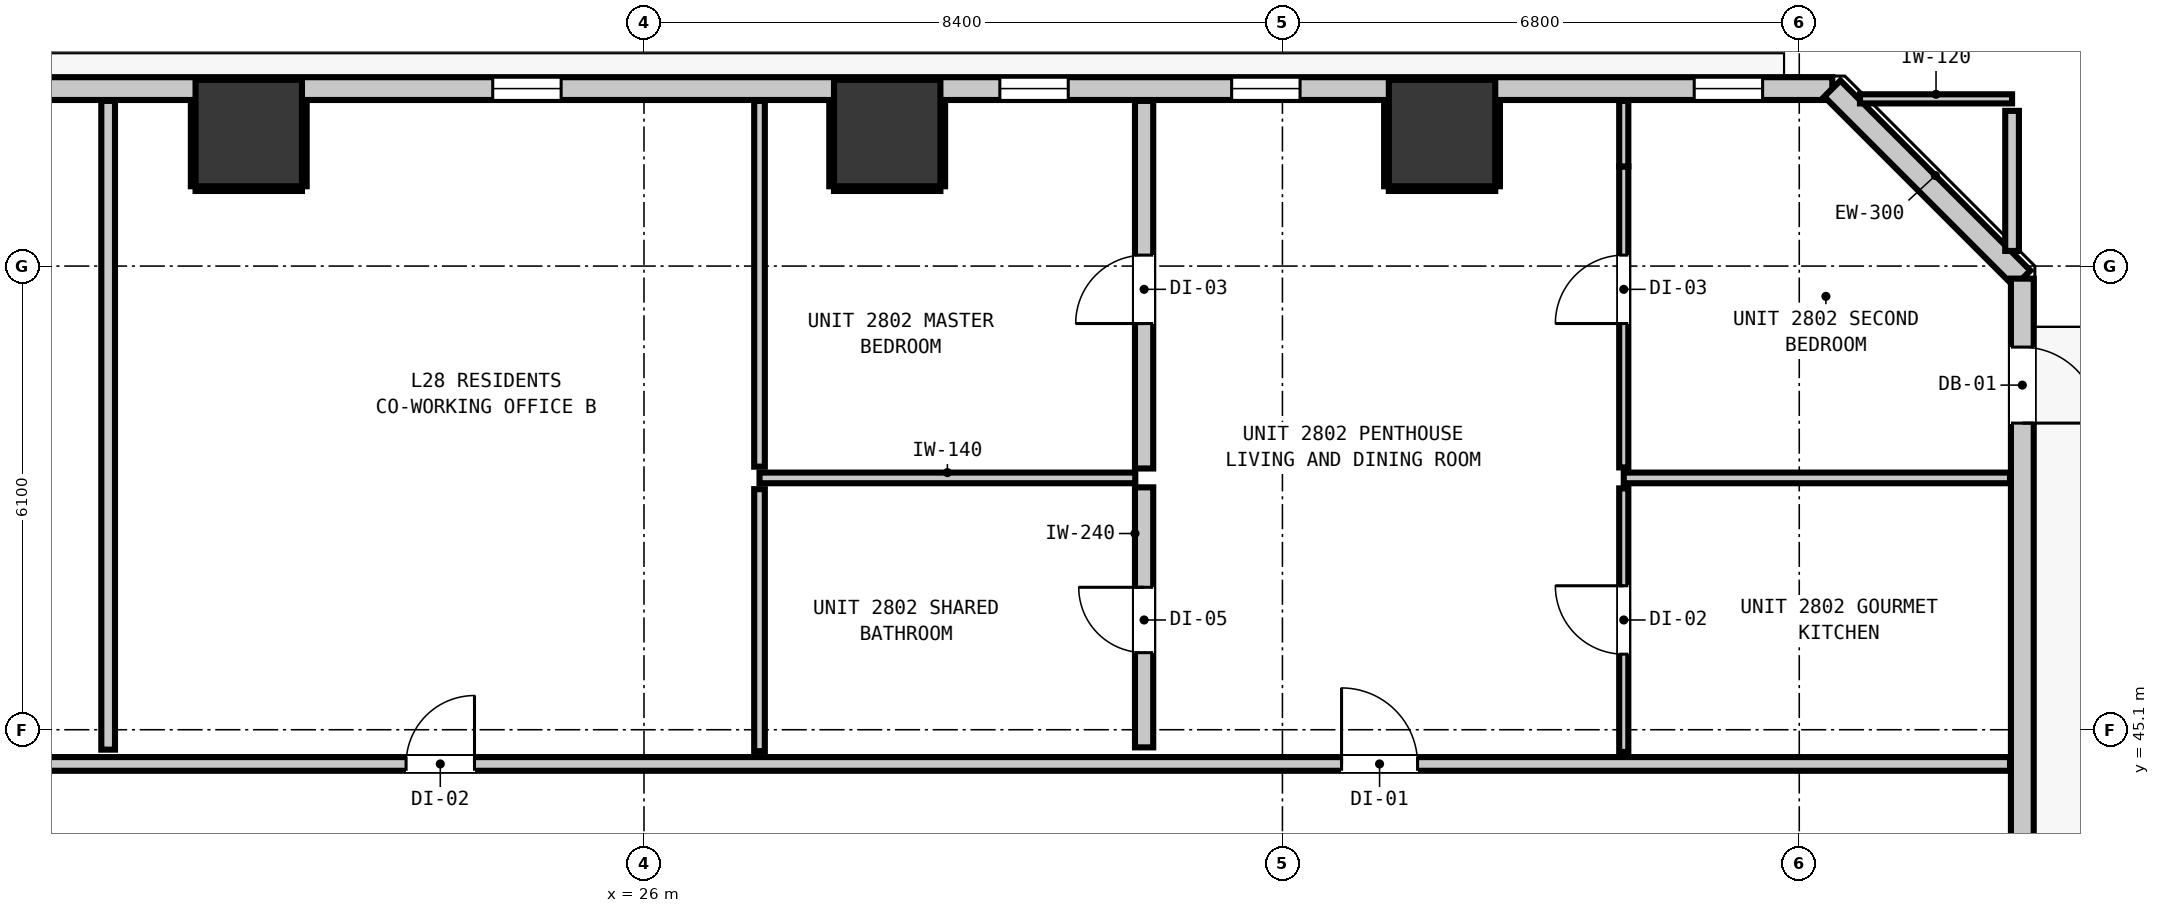
"""IFC4 building model, lengths in metres.
Left out: names, types, materials, properties, quantities, classifications, styles, units other than length and angle.
Written with IfcOpenShell. Run it as: python <this file> out.ifc"""

import sys

from ifc_helpers import new_model, si_unit, direction, frame, frame_2d, origin, origin_2d, place, context, subcontext, project, spatial, rectangle, extrude, element, fill, save


model = new_model("IFC4")
c1 = context("Model", 3, precision=1e-05, world=origin(), true_north=direction((0.0, 1.0)))
c2 = subcontext(c1, "Body", "Model", "MODEL_VIEW")
j1 = project(units=[si_unit("LENGTHUNIT", "METRE"), si_unit("PLANEANGLEUNIT", "RADIAN")], contexts=[c1])
p1 = place(None, origin())
s1 = spatial("IfcSite", under=j1, at=p1, CompositionType="ELEMENT")
p2 = place(p1, origin())
s2 = spatial("IfcBuilding", under=s1, at=p2, CompositionType="ELEMENT")
p3 = place(p2, frame((0.0, 0.0, 99.44)))
s3 = spatial("IfcBuildingStorey", under=s2, at=p3, CompositionType="ELEMENT", Elevation=99.44)
for number, where, z_axis, x_axis in (
    (1, (20.8, 52.95, 0.0), (0.0, 0.0, 1.0), (1.0, 0.0, 0.0)),
    (2, (29.2, 52.95, 0.0), (0.0, 0.0, 1.0), (1.0, 0.0, 0.0)),
    (3, (36.5, 52.95, 0.0), (0.0, 0.0, 1.0), (1.0, 0.0, 0.0)),
):
    element("IfcColumn", number, at=place(p3, frame(where, z_axis=z_axis, x_axis=x_axis)), inside=s3, PredefinedType="COLUMN", context=c2, shape_type="SweptSolid", body=[
        extrude(rectangle(XDim=1.4, YDim=1.4, at=origin_2d()), origin(), (0.0, 0.0, 1.0), 3.32),
    ])
p4 = place(p3, frame((4.165, 53.535, 0.0), z_axis=(0.0, 0.0, 1.0), x_axis=(1.0, 0.0, 0.0)))
e4 = element("IfcWall", 4, at=p4, inside=s3, PredefinedType="STANDARD", context=c2, shape_type="SweptSolid", body=[
    extrude(rectangle(XDim=37.47, YDim=0.3, at=frame_2d((18.735, 0.0))), origin(), (0.0, 0.0, 1.0), 3.06),
])
p5 = place(p4, frame((0.901, 0.0, 0.0)))
e5 = element("IfcOpeningElement", 5, at=p5, cuts=e4, PredefinedType="OPENING", context=c2, shape_type="SweptSolid", body=[
    extrude(rectangle(XDim=1.0, YDim=2.15, at=frame_2d((0.5, 1.075))), frame((0.0, 0.16, 0.0), z_axis=(0.0, -1.0, 0.0), x_axis=(1.0, 0.0, 0.0)), (0.0, 0.0, 1.0), 0.32),
])
p6 = place(p4, frame((4.868, 0.0, 0.85)))
e6 = element("IfcOpeningElement", 6, at=p6, cuts=e4, PredefinedType="OPENING", context=c2, shape_type="SweptSolid", body=[
    extrude(rectangle(XDim=0.9, YDim=1.5, at=frame_2d((0.45, 0.75))), frame((0.0, 0.16, 0.0), z_axis=(0.0, -1.0, 0.0), x_axis=(1.0, 0.0, 0.0)), (0.0, 0.0, 1.0), 0.32),
])
p7 = place(p4, frame((19.845, 0.0, 0.85)))
e7 = element("IfcOpeningElement", 7, at=p7, cuts=e4, PredefinedType="OPENING", context=c2, shape_type="SweptSolid", body=[
    extrude(rectangle(XDim=0.9, YDim=1.5, at=frame_2d((0.45, 0.75))), frame((0.0, 0.16, 0.0), z_axis=(0.0, -1.0, 0.0), x_axis=(1.0, 0.0, 0.0)), (0.0, 0.0, 1.0), 0.32),
])
p8 = place(p4, frame((29.567, 0.0, 0.85)))
e8 = element("IfcOpeningElement", 8, at=p8, cuts=e4, PredefinedType="OPENING", context=c2, shape_type="SweptSolid", body=[
    extrude(rectangle(XDim=0.9, YDim=1.5, at=frame_2d((0.45, 0.75))), frame((0.0, 0.16, 0.0), z_axis=(0.0, -1.0, 0.0), x_axis=(1.0, 0.0, 0.0)), (0.0, 0.0, 1.0), 0.32),
])
p9 = place(p4, frame((26.517, 0.0, 0.85)))
e9 = element("IfcOpeningElement", 9, at=p9, cuts=e4, PredefinedType="OPENING", context=c2, shape_type="SweptSolid", body=[
    extrude(rectangle(XDim=0.9, YDim=1.5, at=frame_2d((0.45, 0.75))), frame((0.0, 0.16, 0.0), z_axis=(0.0, -1.0, 0.0), x_axis=(1.0, 0.0, 0.0)), (0.0, 0.0, 1.0), 0.32),
])
p10 = place(p4, frame((35.653, 0.0, 0.85)))
e10 = element("IfcOpeningElement", 10, at=p10, cuts=e4, PredefinedType="OPENING", context=c2, shape_type="SweptSolid", body=[
    extrude(rectangle(XDim=0.9, YDim=1.5, at=frame_2d((0.45, 0.75))), frame((0.0, 0.16, 0.0), z_axis=(0.0, -1.0, 0.0), x_axis=(1.0, 0.0, 0.0)), (0.0, 0.0, 1.0), 0.32),
])
p11 = place(p3, frame((41.635, 53.535, 0.0), z_axis=(0.0, 0.0, 1.0), x_axis=(0.707106781187, -0.707106781187, 0.0)))
e11 = element("IfcWall", 11, at=p11, inside=s3, PredefinedType="STANDARD", context=c2, shape_type="SweptSolid", body=[
    extrude(rectangle(XDim=3.536, YDim=0.3, at=frame_2d((1.768, 0.0))), origin(), (0.0, 0.0, 1.0), 3.06),
])
p12 = place(p3, frame((44.135, 51.035, 0.0), z_axis=(0.0, 0.0, 1.0), x_axis=(0.0, -1.0, 0.0)))
e12 = element("IfcWall", 12, at=p12, inside=s3, PredefinedType="STANDARD", context=c2, shape_type="SweptSolid", body=[
    extrude(rectangle(XDim=34.67, YDim=0.3, at=frame_2d((17.335, 0.0))), origin(), (0.0, 0.0, 1.0), 3.06),
])
p13 = place(p12, frame((0.901, 0.0, 0.0)))
e13 = element("IfcOpeningElement", 13, at=p13, cuts=e12, PredefinedType="OPENING", context=c2, shape_type="SweptSolid", body=[
    extrude(rectangle(XDim=1.0, YDim=2.15, at=frame_2d((0.5, 1.075))), frame((0.0, 0.16, 0.0), z_axis=(0.0, -1.0, 0.0), x_axis=(1.0, 0.0, 0.0)), (0.0, 0.0, 1.0), 0.32),
])
p14 = place(p12, frame((32.682, 0.0, 0.85)))
e14 = element("IfcOpeningElement", 14, at=p14, cuts=e12, PredefinedType="OPENING", context=c2, shape_type="SweptSolid", body=[
    extrude(rectangle(XDim=0.9, YDim=1.5, at=frame_2d((0.45, 0.75))), frame((0.0, 0.16, 0.0), z_axis=(0.0, -1.0, 0.0), x_axis=(1.0, 0.0, 0.0)), (0.0, 0.0, 1.0), 0.32),
])
p15 = place(p12, frame((23.323, 0.0, 0.85)))
e15 = element("IfcOpeningElement", 15, at=p15, cuts=e12, PredefinedType="OPENING", context=c2, shape_type="SweptSolid", body=[
    extrude(rectangle(XDim=0.9, YDim=1.5, at=frame_2d((0.45, 0.75))), frame((0.0, 0.16, 0.0), z_axis=(0.0, -1.0, 0.0), x_axis=(1.0, 0.0, 0.0)), (0.0, 0.0, 1.0), 0.32),
])
p16 = place(p3, frame((1.827, 44.65, 0.0), z_axis=(0.0, 0.0, 1.0), x_axis=(1.0, 0.0, 0.0)))
e16 = element("IfcWall", 16, at=p16, inside=s3, PredefinedType="PARTITIONING", context=c2, shape_type="SweptSolid", body=[
    extrude(rectangle(XDim=42.146, YDim=0.18, at=frame_2d((21.073, 0.0))), origin(), (0.0, 0.0, 1.0), 3.06),
])
p17 = place(p16, frame((8.207, 0.0, 0.0)))
e17 = element("IfcOpeningElement", 17, at=p17, cuts=e16, PredefinedType="OPENING", context=c2, shape_type="SweptSolid", body=[
    extrude(rectangle(XDim=0.9, YDim=2.1, at=frame_2d((0.45, 1.05))), frame((0.0, 0.1, 0.0), z_axis=(0.0, -1.0, 0.0), x_axis=(1.0, 0.0, 0.0)), (0.0, 0.0, 1.0), 0.2),
])
p18 = place(p16, frame((21.043, 0.0, 0.0)))
e18 = element("IfcOpeningElement", 18, at=p18, cuts=e16, PredefinedType="OPENING", context=c2, shape_type="SweptSolid", body=[
    extrude(rectangle(XDim=0.9, YDim=2.1, at=frame_2d((0.45, 1.05))), frame((0.0, 0.1, 0.0), z_axis=(0.0, -1.0, 0.0), x_axis=(1.0, 0.0, 0.0)), (0.0, 0.0, 1.0), 0.2),
])
p19 = place(p16, frame((33.351, 0.0, 0.0)))
e19 = element("IfcOpeningElement", 19, at=p19, cuts=e16, PredefinedType="OPENING", context=c2, shape_type="SweptSolid", body=[
    extrude(rectangle(XDim=1.0, YDim=2.15, at=frame_2d((0.5, 1.075))), frame((0.0, 0.1, 0.0), z_axis=(0.0, -1.0, 0.0), x_axis=(1.0, 0.0, 0.0)), (0.0, 0.0, 1.0), 0.2),
])
p20 = place(p3, frame((27.52, 48.413, 0.0), z_axis=(0.0, 0.0, 1.0), x_axis=(1.0, 0.0, 0.0)))
e20 = element("IfcWall", 20, at=p20, inside=s3, PredefinedType="PARTITIONING", context=c2, shape_type="SweptSolid", body=[
    extrude(rectangle(XDim=4.944, YDim=0.14, at=frame_2d((2.472, 0.0))), origin(), (0.0, 0.0, 1.0), 3.06),
])
p21 = place(p3, frame((38.891, 48.413, 0.0), z_axis=(0.0, 0.0, 1.0), x_axis=(1.0, 0.0, 0.0)))
e21 = element("IfcWall", 21, at=p21, inside=s3, PredefinedType="PARTITIONING", context=c2, shape_type="SweptSolid", body=[
    extrude(rectangle(XDim=5.082, YDim=0.14, at=frame_2d((2.541, 0.0))), origin(), (0.0, 0.0, 1.0), 3.06),
])
p22 = place(p3, frame((41.999, 53.4, 0.0), z_axis=(0.0, 0.0, 1.0), x_axis=(1.0, 0.0, 0.0)))
e22 = element("IfcWall", 22, at=p22, inside=s3, PredefinedType="PARTITIONING", context=c2, shape_type="SweptSolid", body=[
    extrude(rectangle(XDim=2.001, YDim=0.12, at=frame_2d((1.0, 0.0))), origin(), (0.0, 0.0, 1.0), 3.06),
])
p23 = place(p3, frame((32.58, 44.868, 0.0), z_axis=(0.0, 0.0, 1.0), x_axis=(0.0, 1.0, 0.0)))
e23 = element("IfcWall", 23, at=p23, inside=s3, PredefinedType="PARTITIONING", context=c2, shape_type="SweptSolid", body=[
    extrude(rectangle(XDim=3.421, YDim=0.24, at=frame_2d((1.71, 0.0))), origin(), (0.0, 0.0, 1.0), 3.06),
])
p24 = place(p23, frame((1.246, 0.0, 0.0)))
e24 = element("IfcOpeningElement", 24, at=p24, cuts=e23, PredefinedType="OPENING", context=c2, shape_type="SweptSolid", body=[
    extrude(rectangle(XDim=0.86, YDim=2.02, at=frame_2d((0.43, 1.01))), frame((0.0, 0.13, 0.0), z_axis=(0.0, -1.0, 0.0), x_axis=(1.0, 0.0, 0.0)), (0.0, 0.0, 1.0), 0.26),
])
p25 = place(p3, frame((32.58, 48.537, 0.0), z_axis=(0.0, 0.0, 1.0), x_axis=(0.0, 1.0, 0.0)))
e25 = element("IfcWall", 25, at=p25, inside=s3, PredefinedType="PARTITIONING", context=c2, shape_type="SweptSolid", body=[
    extrude(rectangle(XDim=4.836, YDim=0.24, at=frame_2d((2.418, 0.0))), origin(), (0.0, 0.0, 1.0), 3.06),
])
p26 = place(p25, frame((1.907, 0.0, 0.0)))
e26 = element("IfcOpeningElement", 26, at=p26, cuts=e25, PredefinedType="OPENING", context=c2, shape_type="SweptSolid", body=[
    extrude(rectangle(XDim=0.9, YDim=2.1, at=frame_2d((0.45, 1.05))), frame((0.0, 0.13, 0.0), z_axis=(0.0, -1.0, 0.0), x_axis=(1.0, 0.0, 0.0)), (0.0, 0.0, 1.0), 0.26),
])
p27 = place(p3, frame((18.95, 44.838, 0.0), z_axis=(0.0, 0.0, 1.0), x_axis=(0.0, 1.0, 0.0)))
e27 = element("IfcWall", 27, at=p27, inside=s3, PredefinedType="PARTITIONING", context=c2, shape_type="SweptSolid", body=[
    extrude(rectangle(XDim=8.535, YDim=0.18, at=frame_2d((4.268, 0.0))), origin(), (0.0, 0.0, 1.0), 3.06),
])
p28 = place(p3, frame((44.0, 51.399, 0.0), z_axis=(0.0, 0.0, 1.0), x_axis=(0.0, 1.0, 0.0)))
e28 = element("IfcWall", 28, at=p28, inside=s3, PredefinedType="PARTITIONING", context=c2, shape_type="SweptSolid", body=[
    extrude(rectangle(XDim=1.843, YDim=0.18, at=frame_2d((0.921, 0.0))), origin(), (0.0, 0.0, 1.0), 3.06),
])
p29 = place(p3, frame((27.52, 44.818, 0.0), z_axis=(0.0, 0.0, 1.0), x_axis=(0.0, 1.0, 0.0)))
e29 = element("IfcWall", 29, at=p29, inside=s3, PredefinedType="PARTITIONING", context=c2, shape_type="SweptSolid", body=[
    extrude(rectangle(XDim=3.447, YDim=0.14, at=frame_2d((1.723, 0.0))), origin(), (0.0, 0.0, 1.0), 3.06),
])
p30 = place(p3, frame((27.52, 48.561, 0.0), z_axis=(0.0, 0.0, 1.0), x_axis=(0.0, 1.0, 0.0)))
e30 = element("IfcWall", 30, at=p30, inside=s3, PredefinedType="PARTITIONING", context=c2, shape_type="SweptSolid", body=[
    extrude(rectangle(XDim=4.812, YDim=0.14, at=frame_2d((2.406, 0.0))), origin(), (0.0, 0.0, 1.0), 3.06),
])
p31 = place(p3, frame((38.891, 44.808, 0.0), z_axis=(0.0, 0.0, 1.0), x_axis=(0.0, 1.0, 0.0)))
e31 = element("IfcWall", 31, at=p31, inside=s3, PredefinedType="PARTITIONING", context=c2, shape_type="SweptSolid", body=[
    extrude(rectangle(XDim=3.467, YDim=0.12, at=frame_2d((1.733, 0.0))), origin(), (0.0, 0.0, 1.0), 2.445),
])
p32 = place(p31, frame((1.286, 0.0, 0.0)))
e32 = element("IfcOpeningElement", 32, at=p32, cuts=e31, PredefinedType="OPENING", context=c2, shape_type="SweptSolid", body=[
    extrude(rectangle(XDim=0.9, YDim=2.1, at=frame_2d((0.45, 1.05))), frame((0.0, 0.07, 0.0), z_axis=(0.0, -1.0, 0.0), x_axis=(1.0, 0.0, 0.0)), (0.0, 0.0, 1.0), 0.14),
])
p33 = place(p3, frame((38.891, 48.551, 0.0), z_axis=(0.0, 0.0, 1.0), x_axis=(0.0, 1.0, 0.0)))
e33 = element("IfcWall", 33, at=p33, inside=s3, PredefinedType="PARTITIONING", context=c2, shape_type="SweptSolid", body=[
    extrude(rectangle(XDim=3.96, YDim=0.12, at=frame_2d((1.98, 0.0))), origin(), (0.0, 0.0, 1.0), 2.445),
])
p34 = place(p33, frame((1.893, 0.0, 0.0)))
e34 = element("IfcOpeningElement", 34, at=p34, cuts=e33, PredefinedType="OPENING", context=c2, shape_type="SweptSolid", body=[
    extrude(rectangle(XDim=0.9, YDim=2.1, at=frame_2d((0.45, 1.05))), frame((0.0, 0.07, 0.0), z_axis=(0.0, -1.0, 0.0), x_axis=(1.0, 0.0, 0.0)), (0.0, 0.0, 1.0), 0.14),
])
p35 = place(p3, frame((38.891, 52.511, 0.0), z_axis=(0.0, 0.0, 1.0), x_axis=(0.0, 1.0, 0.0)))
e35 = element("IfcWall", 35, at=p35, inside=s3, PredefinedType="PARTITIONING", context=c2, shape_type="SweptSolid", body=[
    extrude(rectangle(XDim=0.862, YDim=0.12, at=frame_2d((0.431, 0.0))), origin(), (0.0, 0.0, 1.0), 3.06),
])
p36 = place(p3, frame((20.1, 52.218, 0.0), z_axis=(0.0, 0.0, 1.0), x_axis=(1.0, 0.0, 0.0)))
e36 = element("IfcWall", 36, at=p36, inside=s3, PredefinedType="PARTITIONING", context=c2, shape_type="SweptSolid", body=[
    extrude(rectangle(XDim=1.4, YDim=0.06, at=frame_2d((0.7, 0.0))), origin(), (0.0, 0.0, 1.0), 1.45),
])
for number, where, z_axis, x_axis in (
    (37, (20.068, 52.25, 0.0), (0.0, 0.0, 1.0), (0.0, 1.0, 0.0)),
    (38, (21.532, 52.25, 0.0), (0.0, 0.0, 1.0), (0.0, 1.0, 0.0)),
):
    element("IfcWall", number, at=place(p3, frame(where, z_axis=z_axis, x_axis=x_axis)), inside=s3, PredefinedType="PARTITIONING", context=c2, shape_type="SweptSolid", body=[
        extrude(rectangle(XDim=1.12, YDim=0.06, at=frame_2d((0.56, 0.0))), origin(), (0.0, 0.0, 1.0), 1.45),
    ])
p37 = place(p3, frame((28.5, 52.218, 0.0), z_axis=(0.0, 0.0, 1.0), x_axis=(1.0, 0.0, 0.0)))
e39 = element("IfcWall", 39, at=p37, inside=s3, PredefinedType="PARTITIONING", context=c2, shape_type="SweptSolid", body=[
    extrude(rectangle(XDim=1.4, YDim=0.06, at=frame_2d((0.7, 0.0))), origin(), (0.0, 0.0, 1.0), 1.45),
])
for number, where, z_axis, x_axis in (
    (40, (28.468, 52.25, 0.0), (0.0, 0.0, 1.0), (0.0, 1.0, 0.0)),
    (41, (29.932, 52.25, 0.0), (0.0, 0.0, 1.0), (0.0, 1.0, 0.0)),
):
    element("IfcWall", number, at=place(p3, frame(where, z_axis=z_axis, x_axis=x_axis)), inside=s3, PredefinedType="PARTITIONING", context=c2, shape_type="SweptSolid", body=[
        extrude(rectangle(XDim=1.12, YDim=0.06, at=frame_2d((0.56, 0.0))), origin(), (0.0, 0.0, 1.0), 1.45),
    ])
p38 = place(p3, frame((35.8, 52.218, 0.0), z_axis=(0.0, 0.0, 1.0), x_axis=(1.0, 0.0, 0.0)))
e42 = element("IfcWall", 42, at=p38, inside=s3, PredefinedType="PARTITIONING", context=c2, shape_type="SweptSolid", body=[
    extrude(rectangle(XDim=1.4, YDim=0.06, at=frame_2d((0.7, 0.0))), origin(), (0.0, 0.0, 1.0), 1.45),
])
for number, where, z_axis, x_axis in (
    (43, (35.768, 52.25, 0.0), (0.0, 0.0, 1.0), (0.0, 1.0, 0.0)),
    (44, (37.232, 52.25, 0.0), (0.0, 0.0, 1.0), (0.0, 1.0, 0.0)),
):
    element("IfcWall", number, at=place(p3, frame(where, z_axis=z_axis, x_axis=x_axis)), inside=s3, PredefinedType="PARTITIONING", context=c2, shape_type="SweptSolid", body=[
        extrude(rectangle(XDim=1.12, YDim=0.06, at=frame_2d((0.56, 0.0))), origin(), (0.0, 0.0, 1.0), 1.45),
    ])
p39 = place(p13, origin())
e45 = element("IfcDoor", 45, at=p39, inside=s3, OperationType="SINGLE_SWING_RIGHT", PredefinedType="DOOR", context=c2, shape_type="SweptSolid", body=[
    extrude(rectangle(XDim=1.0, YDim=2.15, at=frame_2d((0.5, 1.075))), frame((0.0, 0.025, 0.0), z_axis=(0.0, -1.0, 0.0), x_axis=(1.0, 0.0, 0.0)), (0.0, 0.0, 1.0), 0.05),
])
fill(e13, e45)
p40 = place(p7, origin())
e46 = element("IfcWindow", 46, at=p40, inside=s3, PartitioningType="SINGLE_PANEL", PredefinedType="WINDOW", context=c2, shape_type="SweptSolid", body=[
    extrude(rectangle(XDim=0.9, YDim=1.5, at=frame_2d((0.45, 0.75))), frame((0.0, 0.03, 0.0), z_axis=(0.0, -1.0, 0.0), x_axis=(1.0, 0.0, 0.0)), (0.0, 0.0, 1.0), 0.06),
])
fill(e7, e46)
p41 = place(p8, origin())
e47 = element("IfcWindow", 47, at=p41, inside=s3, PartitioningType="SINGLE_PANEL", PredefinedType="WINDOW", context=c2, shape_type="SweptSolid", body=[
    extrude(rectangle(XDim=0.9, YDim=1.5, at=frame_2d((0.45, 0.75))), frame((0.0, 0.03, 0.0), z_axis=(0.0, -1.0, 0.0), x_axis=(1.0, 0.0, 0.0)), (0.0, 0.0, 1.0), 0.06),
])
fill(e8, e47)
p42 = place(p9, origin())
e48 = element("IfcWindow", 48, at=p42, inside=s3, PartitioningType="SINGLE_PANEL", PredefinedType="WINDOW", context=c2, shape_type="SweptSolid", body=[
    extrude(rectangle(XDim=0.9, YDim=1.5, at=frame_2d((0.45, 0.75))), frame((0.0, 0.03, 0.0), z_axis=(0.0, -1.0, 0.0), x_axis=(1.0, 0.0, 0.0)), (0.0, 0.0, 1.0), 0.06),
])
fill(e9, e48)
p43 = place(p10, origin())
e49 = element("IfcWindow", 49, at=p43, inside=s3, PartitioningType="SINGLE_PANEL", PredefinedType="WINDOW", context=c2, shape_type="SweptSolid", body=[
    extrude(rectangle(XDim=0.9, YDim=1.5, at=frame_2d((0.45, 0.75))), frame((0.0, 0.03, 0.0), z_axis=(0.0, -1.0, 0.0), x_axis=(1.0, 0.0, 0.0)), (0.0, 0.0, 1.0), 0.06),
])
fill(e10, e49)
p44 = place(p18, origin())
e50 = element("IfcDoor", 50, at=p44, inside=s3, OperationType="SINGLE_SWING_RIGHT", PredefinedType="DOOR", context=c2, shape_type="SweptSolid", body=[
    extrude(rectangle(XDim=0.9, YDim=2.1, at=frame_2d((0.45, 1.05))), frame((0.0, 0.025, 0.0), z_axis=(0.0, -1.0, 0.0), x_axis=(1.0, 0.0, 0.0)), (0.0, 0.0, 1.0), 0.05),
])
fill(e18, e50)
p45 = place(p19, origin())
e51 = element("IfcDoor", 51, at=p45, inside=s3, OperationType="SINGLE_SWING_LEFT", PredefinedType="DOOR", context=c2, shape_type="SweptSolid", body=[
    extrude(rectangle(XDim=1.0, YDim=2.15, at=frame_2d((0.5, 1.075))), frame((0.0, 0.025, 0.0), z_axis=(0.0, -1.0, 0.0), x_axis=(1.0, 0.0, 0.0)), (0.0, 0.0, 1.0), 0.05),
])
fill(e19, e51)
p46 = place(p24, origin())
e52 = element("IfcDoor", 52, at=p46, inside=s3, OperationType="SINGLE_SWING_RIGHT", PredefinedType="DOOR", context=c2, shape_type="SweptSolid", body=[
    extrude(rectangle(XDim=0.86, YDim=2.02, at=frame_2d((0.43, 1.01))), frame((0.0, 0.025, 0.0), z_axis=(0.0, -1.0, 0.0), x_axis=(1.0, 0.0, 0.0)), (0.0, 0.0, 1.0), 0.05),
])
fill(e24, e52)
p47 = place(p26, origin())
e53 = element("IfcDoor", 53, at=p47, inside=s3, OperationType="SINGLE_SWING_LEFT", PredefinedType="DOOR", context=c2, shape_type="SweptSolid", body=[
    extrude(rectangle(XDim=0.9, YDim=2.1, at=frame_2d((0.45, 1.05))), frame((0.0, 0.025, 0.0), z_axis=(0.0, -1.0, 0.0), x_axis=(1.0, 0.0, 0.0)), (0.0, 0.0, 1.0), 0.05),
])
fill(e26, e53)
p48 = place(p32, origin())
e54 = element("IfcDoor", 54, at=p48, inside=s3, OperationType="SINGLE_SWING_RIGHT", PredefinedType="DOOR", context=c2, shape_type="SweptSolid", body=[
    extrude(rectangle(XDim=0.9, YDim=2.1, at=frame_2d((0.45, 1.05))), frame((0.0, 0.025, 0.0), z_axis=(0.0, -1.0, 0.0), x_axis=(1.0, 0.0, 0.0)), (0.0, 0.0, 1.0), 0.05),
])
fill(e32, e54)
p49 = place(p34, origin())
e55 = element("IfcDoor", 55, at=p49, inside=s3, OperationType="SINGLE_SWING_LEFT", PredefinedType="DOOR", context=c2, shape_type="SweptSolid", body=[
    extrude(rectangle(XDim=0.9, YDim=2.1, at=frame_2d((0.45, 1.05))), frame((0.0, 0.025, 0.0), z_axis=(0.0, -1.0, 0.0), x_axis=(1.0, 0.0, 0.0)), (0.0, 0.0, 1.0), 0.05),
])
fill(e34, e55)
save(model, sys.argv[1])
